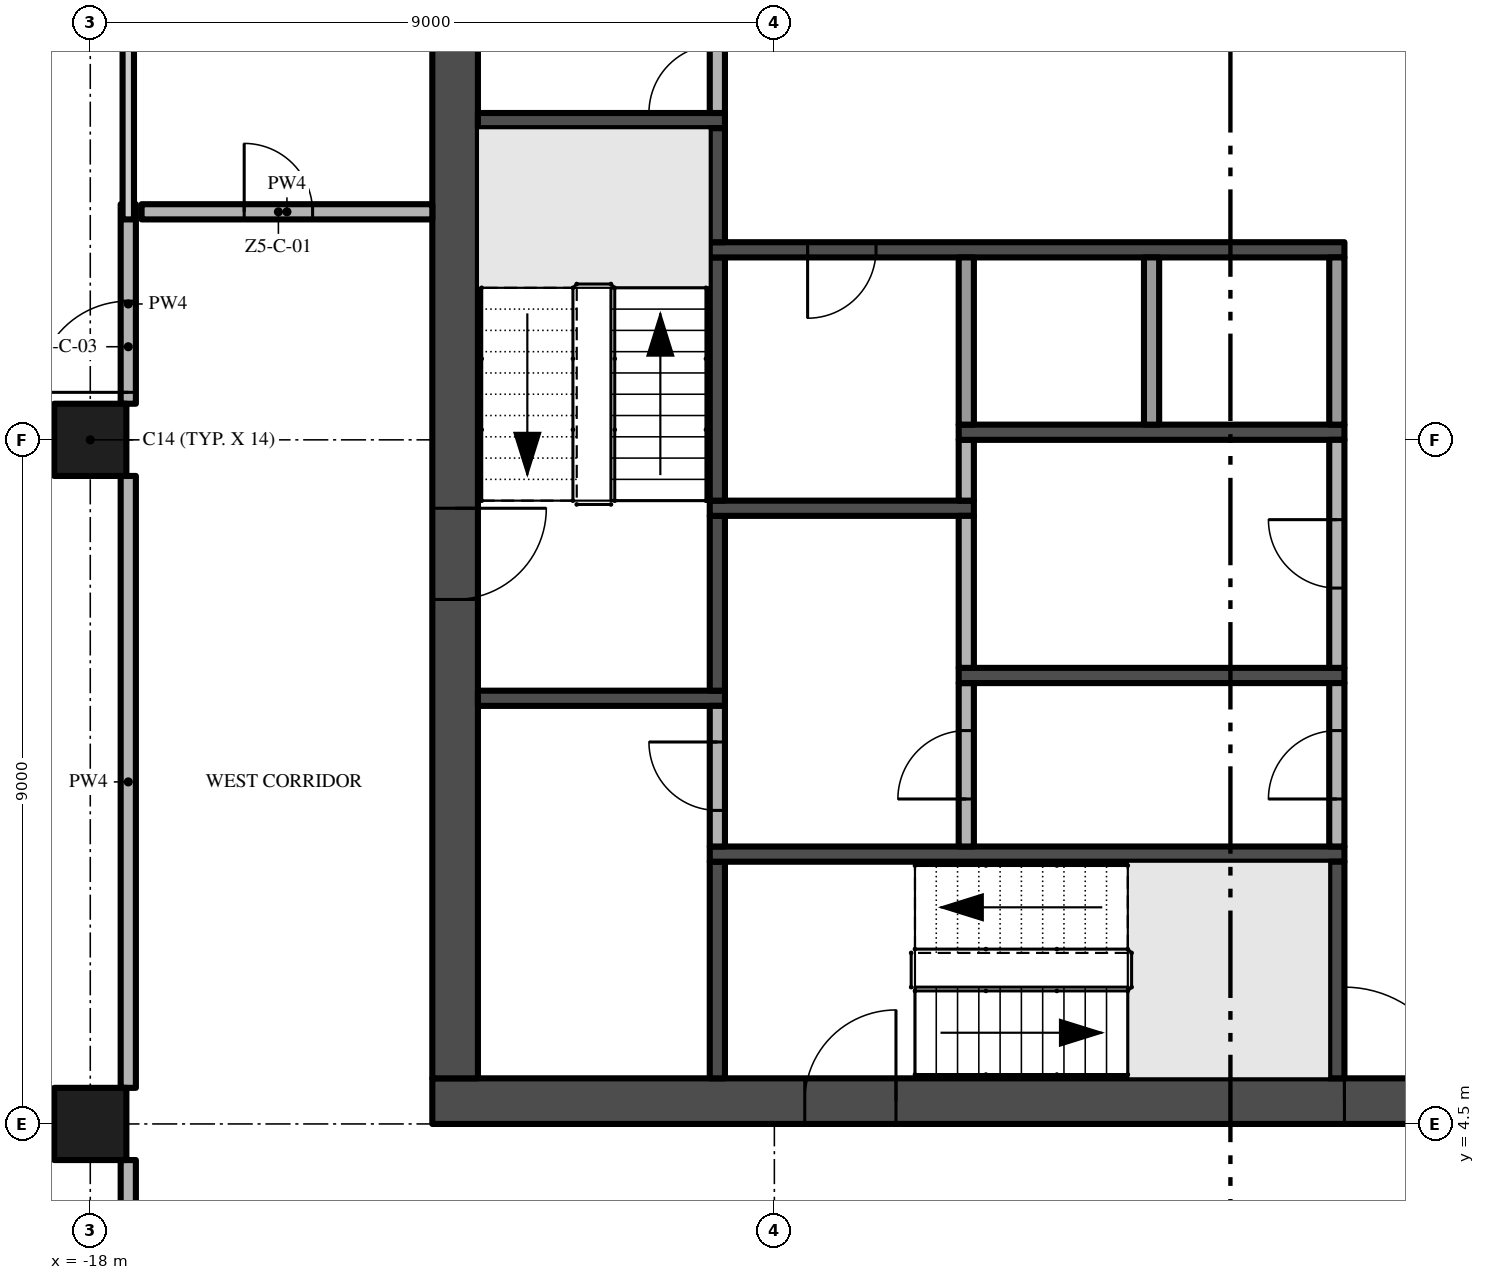
"""IFC4 building model, lengths in metres.
Left out: names, types, materials, properties, quantities, classifications, styles, units other than length and angle.
Written with IfcOpenShell. Run it as: python <this file> out.ifc"""

import sys

from ifc_helpers import new_model, si_unit, direction, frame, frame_2d, origin, origin_2d, place, context, subcontext, project, spatial, rectangle, extrude, element, fill, save


model = new_model("IFC4")
c1 = context("Model", 3, precision=1e-05, world=origin(), true_north=direction((0.0, 1.0)))
c2 = subcontext(c1, "Body", "Model", "MODEL_VIEW")
j1 = project(units=[si_unit("LENGTHUNIT", "METRE"), si_unit("PLANEANGLEUNIT", "RADIAN")], contexts=[c1])
p1 = place(None, origin())
s1 = spatial("IfcSite", under=j1, at=p1, CompositionType="ELEMENT")
p2 = place(p1, origin())
s2 = spatial("IfcBuilding", under=s1, at=p2, CompositionType="ELEMENT")
p3 = place(p2, frame((0.0, 0.0, 261.6)))
s3 = spatial("IfcBuildingStorey", under=s2, at=p3, CompositionType="ELEMENT", Elevation=261.6)
p4 = place(p3, frame((-13.5, 4.8, -0.3), z_axis=(0.0, 0.0, 1.0), x_axis=(1.0, 0.0, 0.0)))
e1 = element("IfcWall", 1, at=p4, inside=s3, PredefinedType="SHEAR", context=c2, shape_type="SweptSolid", body=[
    extrude(rectangle(XDim=27.0, YDim=0.6, at=frame_2d((13.5, 0.0))), origin(), (0.0, 0.0, 1.0), 3.8),
])
p5 = place(p4, frame((12.0, 0.0, 0.3)))
e2 = element("IfcOpeningElement", 2, at=p5, cuts=e1, PredefinedType="OPENING", context=c2, shape_type="SweptSolid", body=[
    extrude(rectangle(XDim=3.0, YDim=2.4, at=frame_2d((1.5, 1.2))), frame((0.0, 0.31, 0.0), z_axis=(0.0, -1.0, 0.0), x_axis=(1.0, 0.0, 0.0)), (0.0, 0.0, 1.0), 0.62),
])
p6 = place(p4, frame((4.9, 0.0, 0.3)))
e3 = element("IfcOpeningElement", 3, at=p6, cuts=e1, PredefinedType="OPENING", context=c2, shape_type="SweptSolid", body=[
    extrude(rectangle(XDim=1.2, YDim=2.2, at=frame_2d((0.6, 1.1))), frame((0.0, 0.31, 0.0), z_axis=(0.0, -1.0, 0.0), x_axis=(1.0, 0.0, 0.0)), (0.0, 0.0, 1.0), 0.62),
])
p7 = place(p4, frame((20.75, 0.0, 0.3)))
e4 = element("IfcOpeningElement", 4, at=p7, cuts=e1, PredefinedType="OPENING", context=c2, shape_type="SweptSolid", body=[
    extrude(rectangle(XDim=1.5, YDim=2.2, at=frame_2d((0.75, 1.1))), frame((0.0, 0.31, 0.0), z_axis=(0.0, -1.0, 0.0), x_axis=(1.0, 0.0, 0.0)), (0.0, 0.0, 1.0), 0.62),
])
p8 = place(p4, frame((17.4, 0.0, 0.3)))
e5 = element("IfcOpeningElement", 5, at=p8, cuts=e1, PredefinedType="OPENING", context=c2, shape_type="SweptSolid", body=[
    extrude(rectangle(XDim=1.2, YDim=2.2, at=frame_2d((0.6, 1.1))), frame((0.0, 0.31, 0.0), z_axis=(0.0, -1.0, 0.0), x_axis=(1.0, 0.0, 0.0)), (0.0, 0.0, 1.0), 0.62),
])
p9 = place(p3, frame((-13.2, 21.9, -0.3), z_axis=(0.0, 0.0, 1.0), x_axis=(0.0, -1.0, 0.0)))
e6 = element("IfcWall", 6, at=p9, inside=s3, PredefinedType="SHEAR", context=c2, shape_type="SweptSolid", body=[
    extrude(rectangle(XDim=16.8, YDim=0.6, at=frame_2d((8.4, 0.0))), origin(), (0.0, 0.0, 1.0), 3.8),
])
p10 = place(p9, frame((9.3, 0.0, 0.3)))
e7 = element("IfcOpeningElement", 7, at=p10, cuts=e6, PredefinedType="OPENING", context=c2, shape_type="SweptSolid", body=[
    extrude(rectangle(XDim=1.2, YDim=2.2, at=frame_2d((0.6, 1.1))), frame((0.0, 0.31, 0.0), z_axis=(0.0, -1.0, 0.0), x_axis=(1.0, 0.0, 0.0)), (0.0, 0.0, 1.0), 0.62),
])
for number, where, z_axis, x_axis in (
    (8, (-18.0, 13.5, 0.0), (0.0, 0.0, 1.0), (1.0, 0.0, 0.0)),
    (9, (-18.0, 4.5, 0.0), (0.0, 0.0, 1.0), (1.0, 0.0, 0.0)),
):
    element("IfcColumn", number, at=place(p3, frame(where, z_axis=z_axis, x_axis=x_axis)), inside=s3, PredefinedType="COLUMN", context=c2, shape_type="SweptSolid", body=[
        extrude(rectangle(XDim=0.95, YDim=0.95, at=origin_2d()), origin(), (0.0, 0.0, 1.0), 3.5),
    ])
for number, where, z_axis, x_axis in (
    (10, (-12.9, 10.1, 0.0), (0.0, 0.0, 1.0), (1.0, 0.0, 0.0)),
    (11, (-12.9, 17.7, 0.0), (0.0, 0.0, 1.0), (1.0, 0.0, 0.0)),
):
    element("IfcWall", number, at=place(p3, frame(where, z_axis=z_axis, x_axis=x_axis)), inside=s3, PredefinedType="SHEAR", context=c2, shape_type="SweptSolid", body=[
        extrude(rectangle(XDim=3.25, YDim=0.2, at=frame_2d((1.625, 0.0))), origin(), (0.0, 0.0, 1.0), 3.5),
    ])
p11 = place(p3, frame((-9.75, 5.1, 0.0), z_axis=(0.0, 0.0, 1.0), x_axis=(0.0, 1.0, 0.0)))
e12 = element("IfcWall", 12, at=p11, inside=s3, PredefinedType="SHEAR", context=c2, shape_type="SweptSolid", body=[
    extrude(rectangle(XDim=2.85, YDim=0.2, at=frame_2d((1.425, 0.0))), origin(), (0.0, 0.0, 1.0), 3.5),
])
p12 = place(p3, frame((-9.85, 8.05, 0.0), z_axis=(0.0, 0.0, 1.0), x_axis=(1.0, 0.0, 0.0)))
e13 = element("IfcWall", 13, at=p12, inside=s3, PredefinedType="SHEAR", context=c2, shape_type="SweptSolid", body=[
    extrude(rectangle(XDim=8.35, YDim=0.2, at=frame_2d((4.175, 0.0))), origin(), (0.0, 0.0, 1.0), 3.5),
])
p13 = place(p3, frame((-9.75, 8.15, 0.0), z_axis=(0.0, 0.0, 1.0), x_axis=(0.0, 1.0, 0.0)))
e14 = element("IfcWall", 14, at=p13, inside=s3, PredefinedType="PARTITIONING", context=c2, shape_type="SweptSolid", body=[
    extrude(rectangle(XDim=1.85, YDim=0.2, at=frame_2d((0.925, 0.0))), origin(), (0.0, 0.0, 1.0), 3.5),
])
p14 = place(p13, frame((0.475, 0.0, 0.0)))
e15 = element("IfcOpeningElement", 15, at=p14, cuts=e14, PredefinedType="OPENING", context=c2, shape_type="SweptSolid", body=[
    extrude(rectangle(XDim=0.9, YDim=2.1, at=frame_2d((0.45, 1.05))), frame((0.0, 0.11, 0.0), z_axis=(0.0, -1.0, 0.0), x_axis=(1.0, 0.0, 0.0)), (0.0, 0.0, 1.0), 0.22),
])
p15 = place(p3, frame((-9.75, 10.2, 0.0), z_axis=(0.0, 0.0, 1.0), x_axis=(0.0, 1.0, 0.0)))
e16 = element("IfcWall", 16, at=p15, inside=s3, PredefinedType="SHEAR", context=c2, shape_type="SweptSolid", body=[
    extrude(rectangle(XDim=2.3, YDim=0.2, at=frame_2d((1.15, 0.0))), origin(), (0.0, 0.0, 1.0), 3.5),
])
p16 = place(p3, frame((-9.85, 12.6, 0.0), z_axis=(0.0, 0.0, 1.0), x_axis=(1.0, 0.0, 0.0)))
e17 = element("IfcWall", 17, at=p16, inside=s3, PredefinedType="SHEAR", context=c2, shape_type="SweptSolid", body=[
    extrude(rectangle(XDim=3.475, YDim=0.2, at=frame_2d((1.738, 0.0))), origin(), (0.0, 0.0, 1.0), 3.5),
])
p17 = place(p3, frame((-9.75, 12.7, 0.0), z_axis=(0.0, 0.0, 1.0), x_axis=(0.0, 1.0, 0.0)))
e18 = element("IfcWall", 18, at=p17, inside=s3, PredefinedType="SHEAR", context=c2, shape_type="SweptSolid", body=[
    extrude(rectangle(XDim=3.2, YDim=0.2, at=frame_2d((1.6, 0.0))), origin(), (0.0, 0.0, 1.0), 3.5),
])
p18 = place(p3, frame((-1.5, 16.0, 0.0), z_axis=(0.0, 0.0, 1.0), x_axis=(-1.0, 0.0, 0.0)))
e19 = element("IfcWall", 19, at=p18, inside=s3, PredefinedType="SHEAR", context=c2, shape_type="SweptSolid", body=[
    extrude(rectangle(XDim=8.35, YDim=0.2, at=frame_2d((4.175, 0.0))), origin(), (0.0, 0.0, 1.0), 3.5),
])
p19 = place(p18, frame((6.162, 0.0, 0.0)))
e20 = element("IfcOpeningElement", 20, at=p19, cuts=e19, PredefinedType="OPENING", context=c2, shape_type="SweptSolid", body=[
    extrude(rectangle(XDim=0.9, YDim=2.1, at=frame_2d((0.45, 1.05))), frame((0.0, 0.11, 0.0), z_axis=(0.0, -1.0, 0.0), x_axis=(1.0, 0.0, 0.0)), (0.0, 0.0, 1.0), 0.22),
])
p20 = place(p3, frame((-9.75, 16.1, 0.0), z_axis=(0.0, 0.0, 1.0), x_axis=(0.0, 1.0, 0.0)))
e21 = element("IfcWall", 21, at=p20, inside=s3, PredefinedType="SHEAR", context=c2, shape_type="SweptSolid", body=[
    extrude(rectangle(XDim=1.5, YDim=0.2, at=frame_2d((0.75, 0.0))), origin(), (0.0, 0.0, 1.0), 3.5),
])
p21 = place(p3, frame((-9.75, 17.8, 0.0), z_axis=(0.0, 0.0, 1.0), x_axis=(0.0, 1.0, 0.0)))
e22 = element("IfcWall", 22, at=p21, inside=s3, PredefinedType="PARTITIONING", context=c2, shape_type="SweptSolid", body=[
    extrude(rectangle(XDim=1.4, YDim=0.2, at=frame_2d((0.7, 0.0))), origin(), (0.0, 0.0, 1.0), 3.5),
])
p22 = place(p21, origin())
e23 = element("IfcOpeningElement", 23, at=p22, cuts=e22, PredefinedType="OPENING", context=c2, shape_type="SweptSolid", body=[
    extrude(rectangle(XDim=0.9, YDim=2.1, at=frame_2d((0.45, 1.05))), frame((0.0, 0.11, 0.0), z_axis=(0.0, -1.0, 0.0), x_axis=(1.0, 0.0, 0.0)), (0.0, 0.0, 1.0), 0.22),
])
p23 = place(p3, frame((-6.475, 8.15, 0.0), z_axis=(0.0, 0.0, 1.0), x_axis=(0.0, 1.0, 0.0)))
e24 = element("IfcWall", 24, at=p23, inside=s3, PredefinedType="PARTITIONING", context=c2, shape_type="SweptSolid", body=[
    extrude(rectangle(XDim=2.15, YDim=0.2, at=frame_2d((1.075, 0.0))), origin(), (0.0, 0.0, 1.0), 3.5),
])
p24 = place(p23, frame((0.625, 0.0, 0.0)))
e25 = element("IfcOpeningElement", 25, at=p24, cuts=e24, PredefinedType="OPENING", context=c2, shape_type="SweptSolid", body=[
    extrude(rectangle(XDim=0.9, YDim=2.1, at=frame_2d((0.45, 1.05))), frame((0.0, 0.11, 0.0), z_axis=(0.0, -1.0, 0.0), x_axis=(1.0, 0.0, 0.0)), (0.0, 0.0, 1.0), 0.22),
])
p25 = place(p3, frame((-6.575, 10.4, 0.0), z_axis=(0.0, 0.0, 1.0), x_axis=(1.0, 0.0, 0.0)))
e26 = element("IfcWall", 26, at=p25, inside=s3, PredefinedType="SHEAR", context=c2, shape_type="SweptSolid", body=[
    extrude(rectangle(XDim=5.075, YDim=0.2, at=frame_2d((2.538, 0.0))), origin(), (0.0, 0.0, 1.0), 3.5),
])
p26 = place(p3, frame((-6.475, 10.5, 0.0), z_axis=(0.0, 0.0, 1.0), x_axis=(0.0, 1.0, 0.0)))
e27 = element("IfcWall", 27, at=p26, inside=s3, PredefinedType="PARTITIONING", context=c2, shape_type="SweptSolid", body=[
    extrude(rectangle(XDim=2.0, YDim=0.2, at=frame_2d((1.0, 0.0))), origin(), (0.0, 0.0, 1.0), 3.5),
])
p27 = place(p3, frame((-6.475, 12.7, 0.0), z_axis=(0.0, 0.0, 1.0), x_axis=(0.0, 1.0, 0.0)))
e28 = element("IfcWall", 28, at=p27, inside=s3, PredefinedType="PARTITIONING", context=c2, shape_type="SweptSolid", body=[
    extrude(rectangle(XDim=0.8, YDim=0.2, at=frame_2d((0.4, 0.0))), origin(), (0.0, 0.0, 1.0), 3.5),
])
p28 = place(p3, frame((-6.575, 13.6, 0.0), z_axis=(0.0, 0.0, 1.0), x_axis=(1.0, 0.0, 0.0)))
e29 = element("IfcWall", 29, at=p28, inside=s3, PredefinedType="SHEAR", context=c2, shape_type="SweptSolid", body=[
    extrude(rectangle(XDim=5.075, YDim=0.2, at=frame_2d((2.538, 0.0))), origin(), (0.0, 0.0, 1.0), 3.5),
])
for number, where, z_axis, x_axis in (
    (30, (-6.475, 13.7, 0.0), (0.0, 0.0, 1.0), (0.0, 1.0, 0.0)),
    (31, (-4.037, 13.7, 0.0), (0.0, 0.0, 1.0), (0.0, 1.0, 0.0)),
):
    element("IfcWall", number, at=place(p3, frame(where, z_axis=z_axis, x_axis=x_axis)), inside=s3, PredefinedType="PARTITIONING", context=c2, shape_type="SweptSolid", body=[
        extrude(rectangle(XDim=2.2, YDim=0.2, at=frame_2d((1.1, 0.0))), origin(), (0.0, 0.0, 1.0), 3.5),
    ])
p29 = place(p3, frame((-1.6, 5.1, 0.0), z_axis=(0.0, 0.0, 1.0), x_axis=(0.0, 1.0, 0.0)))
e32 = element("IfcWall", 32, at=p29, inside=s3, PredefinedType="SHEAR", context=c2, shape_type="SweptSolid", body=[
    extrude(rectangle(XDim=2.85, YDim=0.2, at=frame_2d((1.425, 0.0))), origin(), (0.0, 0.0, 1.0), 3.5),
])
p30 = place(p3, frame((-1.6, 8.15, 0.0), z_axis=(0.0, 0.0, 1.0), x_axis=(0.0, 1.0, 0.0)))
e33 = element("IfcWall", 33, at=p30, inside=s3, PredefinedType="PARTITIONING", context=c2, shape_type="SweptSolid", body=[
    extrude(rectangle(XDim=2.15, YDim=0.2, at=frame_2d((1.075, 0.0))), origin(), (0.0, 0.0, 1.0), 3.5),
])
p31 = place(p30, frame((0.625, 0.0, 0.0)))
e34 = element("IfcOpeningElement", 34, at=p31, cuts=e33, PredefinedType="OPENING", context=c2, shape_type="SweptSolid", body=[
    extrude(rectangle(XDim=0.9, YDim=2.1, at=frame_2d((0.45, 1.05))), frame((0.0, 0.11, 0.0), z_axis=(0.0, -1.0, 0.0), x_axis=(1.0, 0.0, 0.0)), (0.0, 0.0, 1.0), 0.22),
])
p32 = place(p3, frame((-1.6, 10.5, 0.0), z_axis=(0.0, 0.0, 1.0), x_axis=(0.0, 1.0, 0.0)))
e35 = element("IfcWall", 35, at=p32, inside=s3, PredefinedType="PARTITIONING", context=c2, shape_type="SweptSolid", body=[
    extrude(rectangle(XDim=3.0, YDim=0.2, at=frame_2d((1.5, 0.0))), origin(), (0.0, 0.0, 1.0), 3.5),
])
p33 = place(p32, frame((1.05, 0.0, 0.0)))
e36 = element("IfcOpeningElement", 36, at=p33, cuts=e35, PredefinedType="OPENING", context=c2, shape_type="SweptSolid", body=[
    extrude(rectangle(XDim=0.9, YDim=2.1, at=frame_2d((0.45, 1.05))), frame((0.0, 0.11, 0.0), z_axis=(0.0, -1.0, 0.0), x_axis=(1.0, 0.0, 0.0)), (0.0, 0.0, 1.0), 0.22),
])
p34 = place(p3, frame((-1.6, 13.7, 0.0), z_axis=(0.0, 0.0, 1.0), x_axis=(0.0, 1.0, 0.0)))
e37 = element("IfcWall", 37, at=p34, inside=s3, PredefinedType="PARTITIONING", context=c2, shape_type="SweptSolid", body=[
    extrude(rectangle(XDim=2.2, YDim=0.2, at=frame_2d((1.1, 0.0))), origin(), (0.0, 0.0, 1.0), 3.5),
])
p35 = place(p3, frame((-17.325, 16.5, 0.0), z_axis=(0.0, 0.0, 1.0), x_axis=(1.0, 0.0, 0.0)))
e38 = element("IfcWall", 38, at=p35, inside=s3, PredefinedType="PARTITIONING", context=c2, shape_type="SweptSolid", body=[
    extrude(rectangle(XDim=3.825, YDim=0.2, at=frame_2d((1.913, 0.0))), origin(), (0.0, 0.0, 1.0), 3.5),
])
p36 = place(p35, frame((1.35, 0.0, 0.0)))
e39 = element("IfcOpeningElement", 39, at=p36, cuts=e38, PredefinedType="OPENING", context=c2, shape_type="SweptSolid", body=[
    extrude(rectangle(XDim=0.9, YDim=2.1, at=frame_2d((0.45, 1.05))), frame((0.0, 0.11, 0.0), z_axis=(0.0, -1.0, 0.0), x_axis=(1.0, 0.0, 0.0)), (0.0, 0.0, 1.0), 0.22),
])
p37 = place(p3, frame((-17.5, -0.2, 0.0), z_axis=(0.0, 0.0, 1.0), x_axis=(0.0, 1.0, 0.0)))
e40 = element("IfcWall", 40, at=p37, inside=s3, PredefinedType="PARTITIONING", context=c2, shape_type="SweptSolid", body=[
    extrude(rectangle(XDim=4.225, YDim=0.2, at=frame_2d((2.112, 0.0))), origin(), (0.0, 0.0, 1.0), 3.5),
])
p38 = place(p3, frame((-17.5, 4.975, 0.0), z_axis=(0.0, 0.0, 1.0), x_axis=(0.0, 1.0, 0.0)))
e41 = element("IfcWall", 41, at=p38, inside=s3, PredefinedType="PARTITIONING", context=c2, shape_type="SweptSolid", body=[
    extrude(rectangle(XDim=8.05, YDim=0.2, at=frame_2d((4.025, 0.0))), origin(), (0.0, 0.0, 1.0), 3.5),
])
p39 = place(p3, frame((-17.5, 13.975, 0.0), z_axis=(0.0, 0.0, 1.0), x_axis=(0.0, 1.0, 0.0)))
e42 = element("IfcWall", 42, at=p39, inside=s3, PredefinedType="PARTITIONING", context=c2, shape_type="SweptSolid", body=[
    extrude(rectangle(XDim=2.625, YDim=0.2, at=frame_2d((1.312, 0.0))), origin(), (0.0, 0.0, 1.0), 3.5),
])
p40 = place(p39, frame((0.15, 0.0, 0.0)))
e43 = element("IfcOpeningElement", 43, at=p40, cuts=e42, PredefinedType="OPENING", context=c2, shape_type="SweptSolid", body=[
    extrude(rectangle(XDim=1.2, YDim=2.4, at=frame_2d((0.6, 1.2))), frame((0.0, 0.11, 0.0), z_axis=(0.0, -1.0, 0.0), x_axis=(1.0, 0.0, 0.0)), (0.0, 0.0, 1.0), 0.22),
])
p41 = place(p3, frame((-17.5, 16.4, 0.0), z_axis=(0.0, 0.0, 1.0), x_axis=(0.0, 1.0, 0.0)))
e44 = element("IfcWall", 44, at=p41, inside=s3, PredefinedType="PARTITIONING", context=c2, shape_type="SweptSolid", body=[
    extrude(rectangle(XDim=5.2, YDim=0.15, at=frame_2d((2.6, 0.0))), origin(), (0.0, 0.0, 1.0), 3.5),
])
p42 = place(p5, frame((3.0, 0.0, 0.0), z_axis=(0.0, 0.0, 1.0), x_axis=(-1.0, 0.0, 0.0)))
e45 = element("IfcDoor", 45, at=p42, inside=s3, OperationType="DOUBLE_DOOR_SINGLE_SWING", PredefinedType="DOOR", context=c2, shape_type="SweptSolid", body=[
    extrude(rectangle(XDim=3.0, YDim=2.4, at=frame_2d((1.5, 1.2))), frame((0.0, 0.025, 0.0), z_axis=(0.0, -1.0, 0.0), x_axis=(1.0, 0.0, 0.0)), (0.0, 0.0, 1.0), 0.05),
])
fill(e2, e45)
p43 = place(p10, frame((1.2, 0.0, 0.0), z_axis=(0.0, 0.0, 1.0), x_axis=(-1.0, 0.0, 0.0)))
e46 = element("IfcDoor", 46, at=p43, inside=s3, OperationType="SINGLE_SWING_RIGHT", PredefinedType="DOOR", context=c2, shape_type="SweptSolid", body=[
    extrude(rectangle(XDim=1.2, YDim=2.2, at=frame_2d((0.6, 1.1))), frame((0.0, 0.025, 0.0), z_axis=(0.0, -1.0, 0.0), x_axis=(1.0, 0.0, 0.0)), (0.0, 0.0, 1.0), 0.05),
])
fill(e7, e46)
p44 = place(p6, frame((1.2, 0.0, 0.0), z_axis=(0.0, 0.0, 1.0), x_axis=(-1.0, 0.0, 0.0)))
e47 = element("IfcDoor", 47, at=p44, inside=s3, OperationType="SINGLE_SWING_LEFT", PredefinedType="DOOR", context=c2, shape_type="SweptSolid", body=[
    extrude(rectangle(XDim=1.2, YDim=2.2, at=frame_2d((0.6, 1.1))), frame((0.0, 0.025, 0.0), z_axis=(0.0, -1.0, 0.0), x_axis=(1.0, 0.0, 0.0)), (0.0, 0.0, 1.0), 0.05),
])
fill(e3, e47)
p45 = place(p19, origin())
e48 = element("IfcDoor", 48, at=p45, inside=s3, OperationType="SINGLE_SWING_RIGHT", PredefinedType="DOOR", context=c2, shape_type="SweptSolid", body=[
    extrude(rectangle(XDim=0.9, YDim=2.1, at=frame_2d((0.45, 1.05))), frame((0.0, 0.025, 0.0), z_axis=(0.0, -1.0, 0.0), x_axis=(1.0, 0.0, 0.0)), (0.0, 0.0, 1.0), 0.05),
])
fill(e20, e48)
p46 = place(p31, origin())
e49 = element("IfcDoor", 49, at=p46, inside=s3, OperationType="SINGLE_SWING_LEFT", PredefinedType="DOOR", context=c2, shape_type="SweptSolid", body=[
    extrude(rectangle(XDim=0.9, YDim=2.1, at=frame_2d((0.45, 1.05))), frame((0.0, 0.025, 0.0), z_axis=(0.0, -1.0, 0.0), x_axis=(1.0, 0.0, 0.0)), (0.0, 0.0, 1.0), 0.05),
])
fill(e34, e49)
p47 = place(p33, origin())
e50 = element("IfcDoor", 50, at=p47, inside=s3, OperationType="SINGLE_SWING_RIGHT", PredefinedType="DOOR", context=c2, shape_type="SweptSolid", body=[
    extrude(rectangle(XDim=0.9, YDim=2.1, at=frame_2d((0.45, 1.05))), frame((0.0, 0.025, 0.0), z_axis=(0.0, -1.0, 0.0), x_axis=(1.0, 0.0, 0.0)), (0.0, 0.0, 1.0), 0.05),
])
fill(e36, e50)
p48 = place(p22, origin())
e51 = element("IfcDoor", 51, at=p48, inside=s3, OperationType="SINGLE_SWING_LEFT", PredefinedType="DOOR", context=c2, shape_type="SweptSolid", body=[
    extrude(rectangle(XDim=0.9, YDim=2.1, at=frame_2d((0.45, 1.05))), frame((0.0, 0.025, 0.0), z_axis=(0.0, -1.0, 0.0), x_axis=(1.0, 0.0, 0.0)), (0.0, 0.0, 1.0), 0.05),
])
fill(e23, e51)
p49 = place(p24, origin())
e52 = element("IfcDoor", 52, at=p49, inside=s3, OperationType="SINGLE_SWING_LEFT", PredefinedType="DOOR", context=c2, shape_type="SweptSolid", body=[
    extrude(rectangle(XDim=0.9, YDim=2.1, at=frame_2d((0.45, 1.05))), frame((0.0, 0.025, 0.0), z_axis=(0.0, -1.0, 0.0), x_axis=(1.0, 0.0, 0.0)), (0.0, 0.0, 1.0), 0.05),
])
fill(e25, e52)
p50 = place(p14, origin())
e53 = element("IfcDoor", 53, at=p50, inside=s3, OperationType="SINGLE_SWING_RIGHT", PredefinedType="DOOR", context=c2, shape_type="SweptSolid", body=[
    extrude(rectangle(XDim=0.9, YDim=2.1, at=frame_2d((0.45, 1.05))), frame((0.0, 0.025, 0.0), z_axis=(0.0, -1.0, 0.0), x_axis=(1.0, 0.0, 0.0)), (0.0, 0.0, 1.0), 0.05),
])
fill(e15, e53)
p51 = place(p36, origin())
e54 = element("IfcDoor", 54, at=p51, inside=s3, OperationType="SINGLE_SWING_LEFT", PredefinedType="DOOR", context=c2, shape_type="SweptSolid", body=[
    extrude(rectangle(XDim=0.9, YDim=2.1, at=frame_2d((0.45, 1.05))), frame((0.0, 0.025, 0.0), z_axis=(0.0, -1.0, 0.0), x_axis=(1.0, 0.0, 0.0)), (0.0, 0.0, 1.0), 0.05),
])
fill(e39, e54)
p52 = place(p40, origin())
e55 = element("IfcDoor", 55, at=p52, inside=s3, OperationType="SINGLE_SWING_LEFT", PredefinedType="DOOR", context=c2, shape_type="SweptSolid", body=[
    extrude(rectangle(XDim=1.2, YDim=2.4, at=frame_2d((0.6, 1.2))), frame((0.0, 0.025, 0.0), z_axis=(0.0, -1.0, 0.0), x_axis=(1.0, 0.0, 0.0)), (0.0, 0.0, 1.0), 0.05),
])
fill(e43, e55)
save(model, sys.argv[1])
